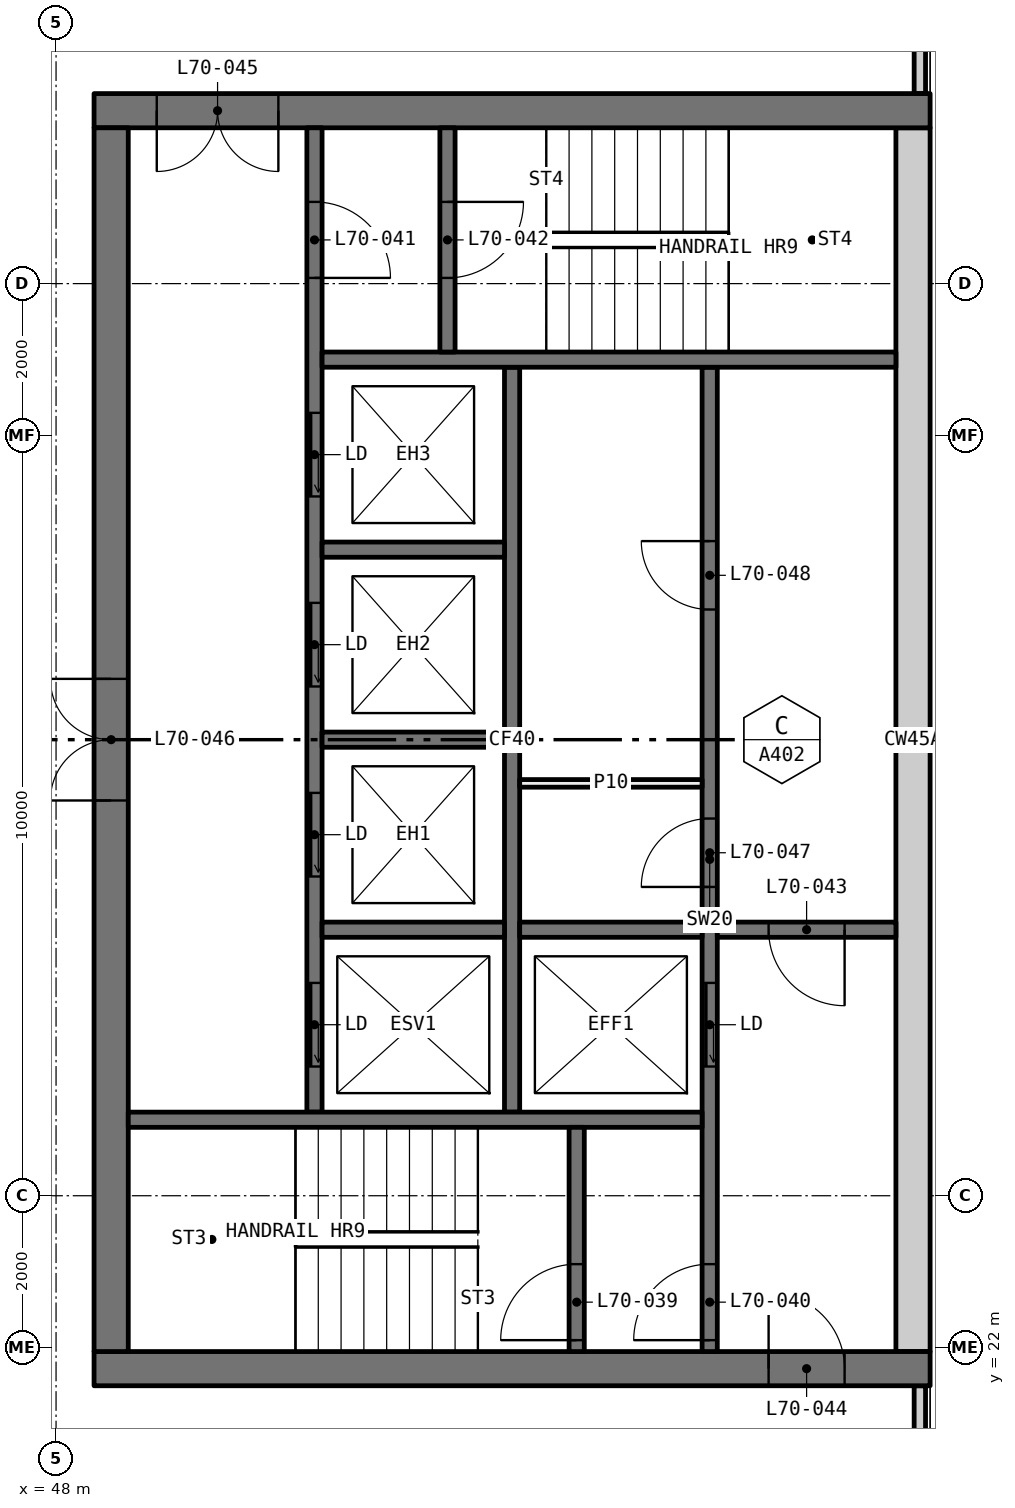
"""IFC4 building model, lengths in metres.
Left out: names, types, materials, properties, quantities, classifications, styles, units other than length and angle.
Written with IfcOpenShell. Run it as: python <this file> out.ifc"""

import sys

from ifc_helpers import new_model, si_unit, direction, frame, frame_2d, origin, place, context, subcontext, project, spatial, rectangle, extrude, element, fill, save


model = new_model("IFC4")
c1 = context("Model", 3, precision=1e-05, world=origin(), true_north=direction((0.0, 1.0)))
c2 = subcontext(c1, "Body", "Model", "MODEL_VIEW")
j1 = project(units=[si_unit("LENGTHUNIT", "METRE"), si_unit("PLANEANGLEUNIT", "RADIAN")], contexts=[c1])
p1 = place(None, origin())
s1 = spatial("IfcSite", under=j1, at=p1, CompositionType="ELEMENT")
p2 = place(p1, origin())
s2 = spatial("IfcBuilding", under=s1, at=p2, CompositionType="ELEMENT")
p3 = place(p2, frame((0.0, 0.0, 259.35)))
s3 = spatial("IfcBuildingStorey", under=s2, at=p3, CompositionType="ELEMENT", Elevation=259.35)
for number, where, z_axis, x_axis in (
    (1, (59.365, 18.71, 0.0), (0.0, 0.0, 1.0), (0.0, 1.0, 0.0)),
    (2, (59.365, 38.5, 0.0), (0.0, 0.0, 1.0), (0.0, 1.0, 0.0)),
):
    element("IfcWall", number, at=place(p3, frame(where, z_axis=z_axis, x_axis=x_axis)), inside=s3, PredefinedType="ELEMENTEDWALL", context=c2, shape_type="SweptSolid", body=[
        extrude(rectangle(XDim=2.79, YDim=0.15, at=frame_2d((1.395, 0.0))), origin(), (0.0, 0.0, 1.0), 3.05),
    ])
p4 = place(p3, frame((59.5, 21.725, 0.0), z_axis=(0.0, 0.0, 1.0), x_axis=(-1.0, 0.0, 0.0)))
e3 = element("IfcWall", 3, at=p4, inside=s3, PredefinedType="SHEAR", context=c2, shape_type="SweptSolid", body=[
    extrude(rectangle(XDim=11.0, YDim=0.45, at=frame_2d((5.5, 0.0))), origin(), (0.0, 0.0, 1.0), 3.05),
])
p5 = place(p4, frame((1.125, 0.0, 0.0)))
e4 = element("IfcOpeningElement", 4, at=p5, cuts=e3, PredefinedType="OPENING", context=c2, shape_type="SweptSolid", body=[
    extrude(rectangle(XDim=1.0, YDim=2.1, at=frame_2d((0.5, 1.05))), frame((0.0, 0.235, 0.0), z_axis=(0.0, -1.0, 0.0), x_axis=(1.0, 0.0, 0.0)), (0.0, 0.0, 1.0), 0.47),
])
p6 = place(p3, frame((59.5, 38.275, 0.0), z_axis=(0.0, 0.0, 1.0), x_axis=(-1.0, 0.0, 0.0)))
e5 = element("IfcWall", 5, at=p6, inside=s3, PredefinedType="SHEAR", context=c2, shape_type="SweptSolid", body=[
    extrude(rectangle(XDim=11.0, YDim=0.45, at=frame_2d((5.5, 0.0))), origin(), (0.0, 0.0, 1.0), 3.05),
])
p7 = place(p6, frame((8.575, 0.0, 0.0)))
e6 = element("IfcOpeningElement", 6, at=p7, cuts=e5, PredefinedType="OPENING", context=c2, shape_type="SweptSolid", body=[
    extrude(rectangle(XDim=1.6, YDim=2.1, at=frame_2d((0.8, 1.05))), frame((0.0, 0.235, 0.0), z_axis=(0.0, -1.0, 0.0), x_axis=(1.0, 0.0, 0.0)), (0.0, 0.0, 1.0), 0.47),
])
p8 = place(p3, frame((59.275, 21.95, 0.0), z_axis=(0.0, 0.0, 1.0), x_axis=(0.0, 1.0, 0.0)))
e7 = element("IfcWall", 7, at=p8, inside=s3, PredefinedType="SHEAR", context=c2, shape_type="SweptSolid", body=[
    extrude(rectangle(XDim=16.1, YDim=0.45, at=frame_2d((8.05, 0.0))), origin(), (0.0, 0.0, 1.0), 3.05),
])
p9 = place(p3, frame((48.725, 21.95, 0.0), z_axis=(0.0, 0.0, 1.0), x_axis=(0.0, 1.0, 0.0)))
e8 = element("IfcWall", 8, at=p9, inside=s3, PredefinedType="SHEAR", context=c2, shape_type="SweptSolid", body=[
    extrude(rectangle(XDim=16.1, YDim=0.45, at=frame_2d((8.05, 0.0))), origin(), (0.0, 0.0, 1.0), 3.05),
])
p10 = place(p9, frame((7.25, 0.0, 0.0)))
e9 = element("IfcOpeningElement", 9, at=p10, cuts=e8, PredefinedType="OPENING", context=c2, shape_type="SweptSolid", body=[
    extrude(rectangle(XDim=1.6, YDim=2.1, at=frame_2d((0.8, 1.05))), frame((0.0, 0.235, 0.0), z_axis=(0.0, -1.0, 0.0), x_axis=(1.0, 0.0, 0.0)), (0.0, 0.0, 1.0), 0.47),
])
p11 = place(p3, frame((56.6, 21.95, 0.0), z_axis=(0.0, 0.0, 1.0), x_axis=(0.0, 1.0, 0.0)))
e10 = element("IfcWall", 10, at=p11, inside=s3, PredefinedType="SOLIDWALL", context=c2, shape_type="SweptSolid", body=[
    extrude(rectangle(XDim=12.95, YDim=0.2, at=frame_2d((6.475, 0.0))), origin(), (0.0, 0.0, 1.0), 3.05),
])
p12 = place(p11, frame((3.75, 0.0, 0.0)))
e11 = element("IfcOpeningElement", 11, at=p12, cuts=e10, PredefinedType="OPENING", context=c2, shape_type="SweptSolid", body=[
    extrude(rectangle(XDim=1.1, YDim=2.1, at=frame_2d((0.55, 1.05))), frame((0.0, 0.11, 0.0), z_axis=(0.0, -1.0, 0.0), x_axis=(1.0, 0.0, 0.0)), (0.0, 0.0, 1.0), 0.22),
])
p13 = place(p11, frame((0.15, 0.0, 0.0)))
e12 = element("IfcOpeningElement", 12, at=p13, cuts=e10, PredefinedType="OPENING", context=c2, shape_type="SweptSolid", body=[
    extrude(rectangle(XDim=1.0, YDim=2.1, at=frame_2d((0.5, 1.05))), frame((0.0, 0.11, 0.0), z_axis=(0.0, -1.0, 0.0), x_axis=(1.0, 0.0, 0.0)), (0.0, 0.0, 1.0), 0.22),
])
p14 = place(p11, frame((6.113, 0.0, 0.0)))
e13 = element("IfcOpeningElement", 13, at=p14, cuts=e10, PredefinedType="OPENING", context=c2, shape_type="SweptSolid", body=[
    extrude(rectangle(XDim=0.9, YDim=2.1, at=frame_2d((0.45, 1.05))), frame((0.0, 0.11, 0.0), z_axis=(0.0, -1.0, 0.0), x_axis=(1.0, 0.0, 0.0)), (0.0, 0.0, 1.0), 0.22),
])
p15 = place(p11, frame((9.762, 0.0, 0.0)))
e14 = element("IfcOpeningElement", 14, at=p15, cuts=e10, PredefinedType="OPENING", context=c2, shape_type="SweptSolid", body=[
    extrude(rectangle(XDim=0.9, YDim=2.1, at=frame_2d((0.45, 1.05))), frame((0.0, 0.11, 0.0), z_axis=(0.0, -1.0, 0.0), x_axis=(1.0, 0.0, 0.0)), (0.0, 0.0, 1.0), 0.22),
])
p16 = place(p3, frame((51.4, 25.1, 0.0), z_axis=(0.0, 0.0, 1.0), x_axis=(0.0, 1.0, 0.0)))
e15 = element("IfcWall", 15, at=p16, inside=s3, PredefinedType="SOLIDWALL", context=c2, shape_type="SweptSolid", body=[
    extrude(rectangle(XDim=12.95, YDim=0.2, at=frame_2d((6.475, 0.0))), origin(), (0.0, 0.0, 1.0), 3.05),
])
p17 = place(p16, frame((0.6, 0.0, 0.0)))
e16 = element("IfcOpeningElement", 16, at=p17, cuts=e15, PredefinedType="OPENING", context=c2, shape_type="SweptSolid", body=[
    extrude(rectangle(XDim=1.1, YDim=2.1, at=frame_2d((0.55, 1.05))), frame((0.0, 0.11, 0.0), z_axis=(0.0, -1.0, 0.0), x_axis=(1.0, 0.0, 0.0)), (0.0, 0.0, 1.0), 0.22),
])
p18 = place(p16, frame((3.1, 0.0, 0.0)))
e17 = element("IfcOpeningElement", 17, at=p18, cuts=e15, PredefinedType="OPENING", context=c2, shape_type="SweptSolid", body=[
    extrude(rectangle(XDim=1.1, YDim=2.1, at=frame_2d((0.55, 1.05))), frame((0.0, 0.11, 0.0), z_axis=(0.0, -1.0, 0.0), x_axis=(1.0, 0.0, 0.0)), (0.0, 0.0, 1.0), 0.22),
])
p19 = place(p16, frame((5.6, 0.0, 0.0)))
e18 = element("IfcOpeningElement", 18, at=p19, cuts=e15, PredefinedType="OPENING", context=c2, shape_type="SweptSolid", body=[
    extrude(rectangle(XDim=1.1, YDim=2.1, at=frame_2d((0.55, 1.05))), frame((0.0, 0.11, 0.0), z_axis=(0.0, -1.0, 0.0), x_axis=(1.0, 0.0, 0.0)), (0.0, 0.0, 1.0), 0.22),
])
p20 = place(p16, frame((8.1, 0.0, 0.0)))
e19 = element("IfcOpeningElement", 19, at=p20, cuts=e15, PredefinedType="OPENING", context=c2, shape_type="SweptSolid", body=[
    extrude(rectangle(XDim=1.1, YDim=2.1, at=frame_2d((0.55, 1.05))), frame((0.0, 0.11, 0.0), z_axis=(0.0, -1.0, 0.0), x_axis=(1.0, 0.0, 0.0)), (0.0, 0.0, 1.0), 0.22),
])
p21 = place(p16, frame((10.975, 0.0, 0.0)))
e20 = element("IfcOpeningElement", 20, at=p21, cuts=e15, PredefinedType="OPENING", context=c2, shape_type="SweptSolid", body=[
    extrude(rectangle(XDim=1.0, YDim=2.1, at=frame_2d((0.5, 1.05))), frame((0.0, 0.11, 0.0), z_axis=(0.0, -1.0, 0.0), x_axis=(1.0, 0.0, 0.0)), (0.0, 0.0, 1.0), 0.22),
])
p22 = place(p3, frame((54.0, 25.1, 0.0), z_axis=(0.0, 0.0, 1.0), x_axis=(0.0, 1.0, 0.0)))
e21 = element("IfcWall", 21, at=p22, inside=s3, PredefinedType="SOLIDWALL", context=c2, shape_type="SweptSolid", body=[
    extrude(rectangle(XDim=9.8, YDim=0.2, at=frame_2d((4.9, 0.0))), origin(), (0.0, 0.0, 1.0), 3.05),
])
for number, where, z_axis, x_axis in (
    (22, (56.5, 25.0, 0.0), (0.0, 0.0, 1.0), (-1.0, 0.0, 0.0)),
    (23, (59.05, 35.0, 0.0), (0.0, 0.0, 1.0), (-1.0, 0.0, 0.0)),
):
    element("IfcWall", number, at=place(p3, frame(where, z_axis=z_axis, x_axis=x_axis)), inside=s3, PredefinedType="SOLIDWALL", context=c2, shape_type="SweptSolid", body=[
        extrude(rectangle(XDim=7.55, YDim=0.2, at=frame_2d((3.775, 0.0))), origin(), (0.0, 0.0, 1.0), 3.05),
    ])
p23 = place(p3, frame((59.05, 27.5, 0.0), z_axis=(0.0, 0.0, 1.0), x_axis=(-1.0, 0.0, 0.0)))
e24 = element("IfcWall", 24, at=p23, inside=s3, PredefinedType="SOLIDWALL", context=c2, shape_type="SweptSolid", body=[
    extrude(rectangle(XDim=2.35, YDim=0.2, at=frame_2d((1.175, 0.0))), origin(), (0.0, 0.0, 1.0), 3.05),
])
p24 = place(p23, frame((0.675, 0.0, 0.0)))
e25 = element("IfcOpeningElement", 25, at=p24, cuts=e24, PredefinedType="OPENING", context=c2, shape_type="SweptSolid", body=[
    extrude(rectangle(XDim=1.0, YDim=2.1, at=frame_2d((0.5, 1.05))), frame((0.0, 0.11, 0.0), z_axis=(0.0, -1.0, 0.0), x_axis=(1.0, 0.0, 0.0)), (0.0, 0.0, 1.0), 0.22),
])
p25 = place(p3, frame((54.85, 21.95, 0.0), z_axis=(0.0, 0.0, 1.0), x_axis=(0.0, 1.0, 0.0)))
e26 = element("IfcWall", 26, at=p25, inside=s3, PredefinedType="SOLIDWALL", context=c2, shape_type="SweptSolid", body=[
    extrude(rectangle(XDim=2.95, YDim=0.2, at=frame_2d((1.475, 0.0))), origin(), (0.0, 0.0, 1.0), 3.05),
])
p26 = place(p25, frame((0.15, 0.0, 0.0)))
e27 = element("IfcOpeningElement", 27, at=p26, cuts=e26, PredefinedType="OPENING", context=c2, shape_type="SweptSolid", body=[
    extrude(rectangle(XDim=1.0, YDim=2.1, at=frame_2d((0.5, 1.05))), frame((0.0, 0.11, 0.0), z_axis=(0.0, -1.0, 0.0), x_axis=(1.0, 0.0, 0.0)), (0.0, 0.0, 1.0), 0.22),
])
p27 = place(p3, frame((53.15, 35.1, 0.0), z_axis=(0.0, 0.0, 1.0), x_axis=(0.0, 1.0, 0.0)))
e28 = element("IfcWall", 28, at=p27, inside=s3, PredefinedType="SOLIDWALL", context=c2, shape_type="SweptSolid", body=[
    extrude(rectangle(XDim=2.95, YDim=0.2, at=frame_2d((1.475, 0.0))), origin(), (0.0, 0.0, 1.0), 3.05),
])
p28 = place(p27, frame((0.975, 0.0, 0.0)))
e29 = element("IfcOpeningElement", 29, at=p28, cuts=e28, PredefinedType="OPENING", context=c2, shape_type="SweptSolid", body=[
    extrude(rectangle(XDim=1.0, YDim=2.1, at=frame_2d((0.5, 1.05))), frame((0.0, 0.11, 0.0), z_axis=(0.0, -1.0, 0.0), x_axis=(1.0, 0.0, 0.0)), (0.0, 0.0, 1.0), 0.22),
])
for number, where, z_axis, x_axis in (
    (30, (56.5, 27.5, 0.0), (0.0, 0.0, 1.0), (-1.0, 0.0, 0.0)),
    (31, (53.9, 27.5, 0.0), (0.0, 0.0, 1.0), (-1.0, 0.0, 0.0)),
    (32, (53.9, 30.0, 0.0), (0.0, 0.0, 1.0), (-1.0, 0.0, 0.0)),
    (33, (53.9, 32.5, 0.0), (0.0, 0.0, 1.0), (-1.0, 0.0, 0.0)),
):
    element("IfcWall", number, at=place(p3, frame(where, z_axis=z_axis, x_axis=x_axis)), inside=s3, PredefinedType="SOLIDWALL", context=c2, shape_type="SweptSolid", body=[
        extrude(rectangle(XDim=2.4, YDim=0.2, at=frame_2d((1.2, 0.0))), origin(), (0.0, 0.0, 1.0), 3.05),
    ])
p29 = place(p3, frame((56.5, 29.425, 0.0), z_axis=(0.0, 0.0, 1.0), x_axis=(-1.0, 0.0, 0.0)))
e34 = element("IfcWall", 34, at=p29, inside=s3, PredefinedType="PARTITIONING", context=c2, shape_type="SweptSolid", body=[
    extrude(rectangle(XDim=2.4, YDim=0.1, at=frame_2d((1.2, 0.0))), origin(), (0.0, 0.0, 1.0), 3.05),
])
p30 = place(p17, origin())
e35 = element("IfcDoor", 35, at=p30, inside=s3, OperationType="SLIDING_TO_LEFT", PredefinedType="DOOR", context=c2, shape_type="SweptSolid", body=[
    extrude(rectangle(XDim=1.1, YDim=2.1, at=frame_2d((0.55, 1.05))), frame((0.0, 0.025, 0.0), z_axis=(0.0, -1.0, 0.0), x_axis=(1.0, 0.0, 0.0)), (0.0, 0.0, 1.0), 0.05),
])
fill(e16, e35)
p31 = place(p18, origin())
e36 = element("IfcDoor", 36, at=p31, inside=s3, OperationType="SLIDING_TO_LEFT", PredefinedType="DOOR", context=c2, shape_type="SweptSolid", body=[
    extrude(rectangle(XDim=1.1, YDim=2.1, at=frame_2d((0.55, 1.05))), frame((0.0, 0.025, 0.0), z_axis=(0.0, -1.0, 0.0), x_axis=(1.0, 0.0, 0.0)), (0.0, 0.0, 1.0), 0.05),
])
fill(e17, e36)
p32 = place(p19, origin())
e37 = element("IfcDoor", 37, at=p32, inside=s3, OperationType="SLIDING_TO_LEFT", PredefinedType="DOOR", context=c2, shape_type="SweptSolid", body=[
    extrude(rectangle(XDim=1.1, YDim=2.1, at=frame_2d((0.55, 1.05))), frame((0.0, 0.025, 0.0), z_axis=(0.0, -1.0, 0.0), x_axis=(1.0, 0.0, 0.0)), (0.0, 0.0, 1.0), 0.05),
])
fill(e18, e37)
p33 = place(p20, origin())
e38 = element("IfcDoor", 38, at=p33, inside=s3, OperationType="SLIDING_TO_LEFT", PredefinedType="DOOR", context=c2, shape_type="SweptSolid", body=[
    extrude(rectangle(XDim=1.1, YDim=2.1, at=frame_2d((0.55, 1.05))), frame((0.0, 0.025, 0.0), z_axis=(0.0, -1.0, 0.0), x_axis=(1.0, 0.0, 0.0)), (0.0, 0.0, 1.0), 0.05),
])
fill(e19, e38)
p34 = place(p12, origin())
e39 = element("IfcDoor", 39, at=p34, inside=s3, OperationType="SLIDING_TO_LEFT", PredefinedType="DOOR", context=c2, shape_type="SweptSolid", body=[
    extrude(rectangle(XDim=1.1, YDim=2.1, at=frame_2d((0.55, 1.05))), frame((0.0, 0.025, 0.0), z_axis=(0.0, -1.0, 0.0), x_axis=(1.0, 0.0, 0.0)), (0.0, 0.0, 1.0), 0.05),
])
fill(e11, e39)
p35 = place(p26, origin())
e40 = element("IfcDoor", 40, at=p35, inside=s3, OperationType="SINGLE_SWING_RIGHT", PredefinedType="DOOR", context=c2, shape_type="SweptSolid", body=[
    extrude(rectangle(XDim=1.0, YDim=2.1, at=frame_2d((0.5, 1.05))), frame((0.0, 0.025, 0.0), z_axis=(0.0, -1.0, 0.0), x_axis=(1.0, 0.0, 0.0)), (0.0, 0.0, 1.0), 0.05),
])
fill(e27, e40)
p36 = place(p13, origin())
e41 = element("IfcDoor", 41, at=p36, inside=s3, OperationType="SINGLE_SWING_RIGHT", PredefinedType="DOOR", context=c2, shape_type="SweptSolid", body=[
    extrude(rectangle(XDim=1.0, YDim=2.1, at=frame_2d((0.5, 1.05))), frame((0.0, 0.025, 0.0), z_axis=(0.0, -1.0, 0.0), x_axis=(1.0, 0.0, 0.0)), (0.0, 0.0, 1.0), 0.05),
])
fill(e12, e41)
p37 = place(p21, frame((1.0, 0.0, 0.0), x_axis=(-1.0, 0.0, 0.0)))
e42 = element("IfcDoor", 42, at=p37, inside=s3, OperationType="SINGLE_SWING_LEFT", PredefinedType="DOOR", context=c2, shape_type="SweptSolid", body=[
    extrude(rectangle(XDim=1.0, YDim=2.1, at=frame_2d((0.5, 1.05))), frame((0.0, 0.025, 0.0), z_axis=(0.0, -1.0, 0.0), x_axis=(1.0, 0.0, 0.0)), (0.0, 0.0, 1.0), 0.05),
])
fill(e20, e42)
p38 = place(p28, frame((1.0, 0.0, 0.0), x_axis=(-1.0, 0.0, 0.0)))
e43 = element("IfcDoor", 43, at=p38, inside=s3, OperationType="SINGLE_SWING_RIGHT", PredefinedType="DOOR", context=c2, shape_type="SweptSolid", body=[
    extrude(rectangle(XDim=1.0, YDim=2.1, at=frame_2d((0.5, 1.05))), frame((0.0, 0.025, 0.0), z_axis=(0.0, -1.0, 0.0), x_axis=(1.0, 0.0, 0.0)), (0.0, 0.0, 1.0), 0.05),
])
fill(e29, e43)
p39 = place(p24, origin())
e44 = element("IfcDoor", 44, at=p39, inside=s3, OperationType="SINGLE_SWING_RIGHT", PredefinedType="DOOR", context=c2, shape_type="SweptSolid", body=[
    extrude(rectangle(XDim=1.0, YDim=2.1, at=frame_2d((0.5, 1.05))), frame((0.0, 0.025, 0.0), z_axis=(0.0, -1.0, 0.0), x_axis=(1.0, 0.0, 0.0)), (0.0, 0.0, 1.0), 0.05),
])
fill(e25, e44)
p40 = place(p5, frame((1.0, 0.0, 0.0), x_axis=(-1.0, 0.0, 0.0)))
e45 = element("IfcDoor", 45, at=p40, inside=s3, OperationType="SINGLE_SWING_RIGHT", PredefinedType="DOOR", context=c2, shape_type="SweptSolid", body=[
    extrude(rectangle(XDim=1.0, YDim=2.1, at=frame_2d((0.5, 1.05))), frame((0.0, 0.025, 0.0), z_axis=(0.0, -1.0, 0.0), x_axis=(1.0, 0.0, 0.0)), (0.0, 0.0, 1.0), 0.05),
])
fill(e4, e45)
p41 = place(p7, origin())
e46 = element("IfcDoor", 46, at=p41, inside=s3, OperationType="DOUBLE_DOOR_SINGLE_SWING", PredefinedType="DOOR", context=c2, shape_type="SweptSolid", body=[
    extrude(rectangle(XDim=1.6, YDim=2.1, at=frame_2d((0.8, 1.05))), frame((0.0, 0.025, 0.0), z_axis=(0.0, -1.0, 0.0), x_axis=(1.0, 0.0, 0.0)), (0.0, 0.0, 1.0), 0.05),
])
fill(e6, e46)
p42 = place(p10, origin())
e47 = element("IfcDoor", 47, at=p42, inside=s3, OperationType="DOUBLE_DOOR_SINGLE_SWING", PredefinedType="DOOR", context=c2, shape_type="SweptSolid", body=[
    extrude(rectangle(XDim=1.6, YDim=2.1, at=frame_2d((0.8, 1.05))), frame((0.0, 0.025, 0.0), z_axis=(0.0, -1.0, 0.0), x_axis=(1.0, 0.0, 0.0)), (0.0, 0.0, 1.0), 0.05),
])
fill(e9, e47)
p43 = place(p14, origin())
e48 = element("IfcDoor", 48, at=p43, inside=s3, OperationType="SINGLE_SWING_RIGHT", PredefinedType="DOOR", context=c2, shape_type="SweptSolid", body=[
    extrude(rectangle(XDim=0.9, YDim=2.1, at=frame_2d((0.45, 1.05))), frame((0.0, 0.025, 0.0), z_axis=(0.0, -1.0, 0.0), x_axis=(1.0, 0.0, 0.0)), (0.0, 0.0, 1.0), 0.05),
])
fill(e13, e48)
p44 = place(p15, origin())
e49 = element("IfcDoor", 49, at=p44, inside=s3, OperationType="SINGLE_SWING_LEFT", PredefinedType="DOOR", context=c2, shape_type="SweptSolid", body=[
    extrude(rectangle(XDim=0.9, YDim=2.1, at=frame_2d((0.45, 1.05))), frame((0.0, 0.025, 0.0), z_axis=(0.0, -1.0, 0.0), x_axis=(1.0, 0.0, 0.0)), (0.0, 0.0, 1.0), 0.05),
])
fill(e14, e49)
save(model, sys.argv[1])
